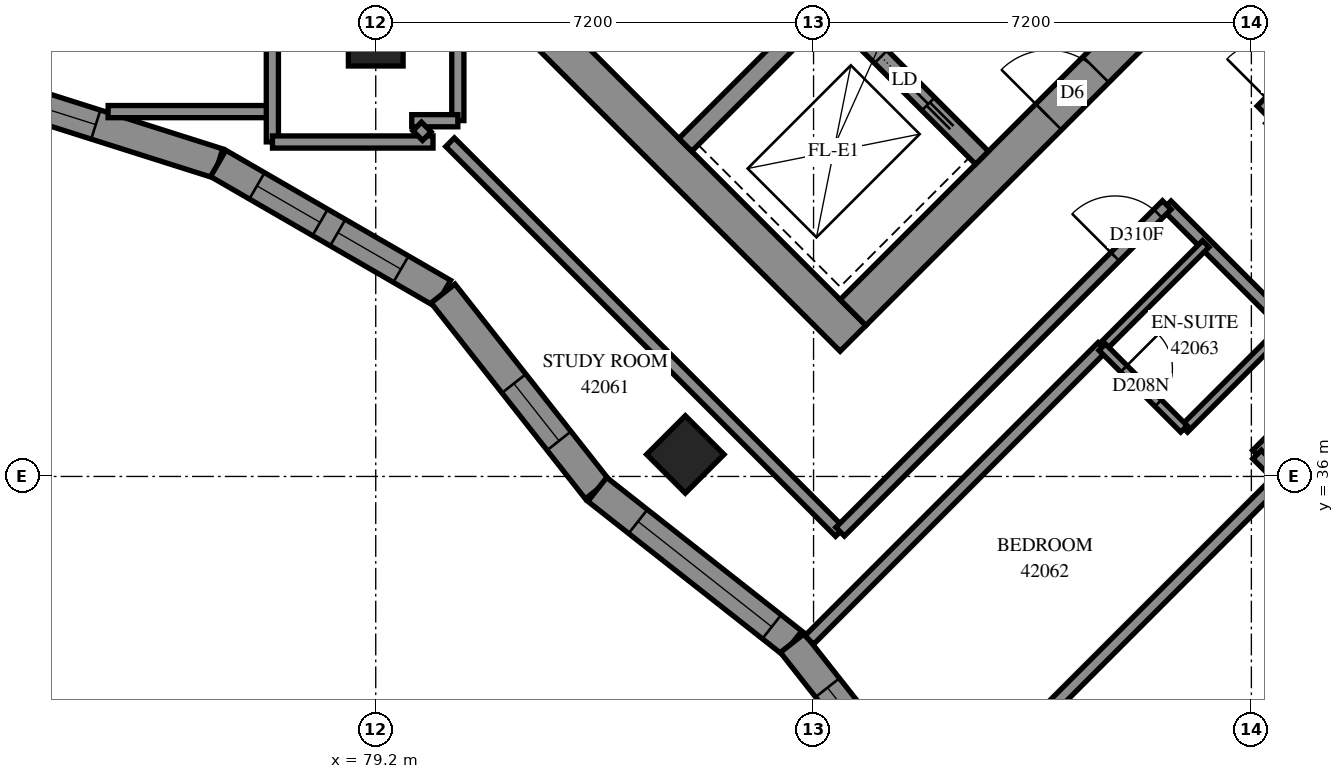
"""IFC4 building model, lengths in metres.
Left out: names, types, materials, properties, quantities, classifications, styles, units other than length and angle.
Written with IfcOpenShell. Run it as: python <this file> out.ifc"""

import sys

from ifc_helpers import new_model, si_unit, direction, frame, frame_2d, origin, origin_2d, place, context, subcontext, project, spatial, polyline, rectangle, outline, extrude, element, fill, save


model = new_model("IFC4")
c1 = context("Model", 3, precision=1e-05, world=origin(), true_north=direction((0.0, 1.0)))
c2 = subcontext(c1, "Body", "Model", "MODEL_VIEW")
j1 = project(units=[si_unit("LENGTHUNIT", "METRE"), si_unit("PLANEANGLEUNIT", "RADIAN")], contexts=[c1])
p1 = place(None, origin())
s1 = spatial("IfcSite", under=j1, at=p1, CompositionType="ELEMENT")
p2 = place(p1, origin())
s2 = spatial("IfcBuilding", under=s1, at=p2, CompositionType="ELEMENT")
p3 = place(p2, frame((0.0, 0.0, 155.8)))
s3 = spatial("IfcBuildingStorey", under=s2, at=p3, CompositionType="ELEMENT", Elevation=155.8)
for number, where, z_axis, x_axis in (
    (1, (79.2, 43.2, 0.0), (0.0, 0.0, 1.0), (1.0, 0.0, 0.0)),
    (2, (84.291, 36.362, 0.0), (0.0, 0.0, 1.0), (0.707, -0.707, 0.0)),
):
    element("IfcColumn", number, at=place(p3, frame(where, z_axis=z_axis, x_axis=x_axis)), inside=s3, PredefinedType="COLUMN", context=c2, shape_type="SweptSolid", body=[
        extrude(rectangle(XDim=0.9, YDim=0.9, at=origin_2d()), origin(), (0.0, 0.0, 1.0), 3.1),
    ])
p4 = place(p3, frame((76.018, 49.302, -0.3), z_axis=(0.0, 0.0, 1.0), x_axis=(0.7071067812, -0.7071067812, 0.0)))
e3 = element("IfcWall", 3, at=p4, inside=s3, PredefinedType="SHEAR", context=c2, shape_type="SweptSolid", body=[
    extrude(rectangle(XDim=15.6, YDim=0.6, at=frame_2d((7.8, 0.0))), origin(), (0.0, 0.0, 1.0), 2.7),
])
p5 = place(p3, frame((87.049, 38.695, -0.3), z_axis=(0.0, 0.0, 1.0), x_axis=(0.7071067812, 0.7071067812, 0.0)))
e4 = element("IfcWall", 4, at=p5, inside=s3, PredefinedType="SHEAR", context=c2, shape_type="SweptSolid", body=[
    extrude(rectangle(XDim=14.4, YDim=0.6, at=frame_2d((7.2, 0.0))), origin(), (0.0, 0.0, 1.0), 2.7),
])
p6 = place(p5, frame((4.55, 0.0, 0.3)))
e5 = element("IfcOpeningElement", 5, at=p6, cuts=e4, PredefinedType="OPENING", context=c2, shape_type="SweptSolid", body=[
    extrude(rectangle(XDim=1.1, YDim=2.1, at=frame_2d((0.55, 1.05))), frame((0.0, 0.31, 0.0), z_axis=(0.0, -1.0, 0.0), x_axis=(1.0, 0.0, 0.0)), (0.0, 0.0, 1.0), 0.62),
])
p7 = place(p5, frame((11.35, 0.0, 0.3)))
e6 = element("IfcOpeningElement", 6, at=p7, cuts=e4, PredefinedType="OPENING", context=c2, shape_type="SweptSolid", body=[
    extrude(rectangle(XDim=1.1, YDim=2.1, at=frame_2d((0.55, 1.05))), frame((0.0, 0.31, 0.0), z_axis=(0.0, -1.0, 0.0), x_axis=(1.0, 0.0, 0.0)), (0.0, 0.0, 1.0), 0.62),
])
p8 = place(p3, frame((84.291, 41.453, 0.0), z_axis=(0.0, 0.0, 1.0), x_axis=(0.7071067812, 0.7071067812, 0.0)))
e7 = element("IfcWall", 7, at=p8, inside=s3, PredefinedType="SOLIDWALL", context=c2, shape_type="SweptSolid", body=[
    extrude(rectangle(XDim=3.3, YDim=0.3, at=frame_2d((1.65, 0.0))), origin(), (0.0, 0.0, 1.0), 3.1),
])
p9 = place(p3, frame((78.988, 51.423, 0.0), z_axis=(0.0, 0.0, 1.0), x_axis=(0.7071067812, -0.7071067812, 0.0)))
e8 = element("IfcWall", 8, at=p9, inside=s3, PredefinedType="SOLIDWALL", context=c2, shape_type="SweptSolid", body=[
    extrude(rectangle(XDim=14.4, YDim=0.3, at=frame_2d((7.2, 0.0))), origin(), (0.0, 0.0, 1.0), 3.1),
])
p10 = place(p9, frame((1.35, 0.0, 0.0)))
e9 = element("IfcOpeningElement", 9, at=p10, cuts=e8, PredefinedType="OPENING", context=c2, shape_type="SweptSolid", body=[
    extrude(rectangle(XDim=0.9, YDim=2.1, at=frame_2d((0.45, 1.05))), frame((0.0, 0.16, 0.0), z_axis=(0.0, -1.0, 0.0), x_axis=(1.0, 0.0, 0.0)), (0.0, 0.0, 1.0), 0.32),
])
p11 = place(p9, frame((4.95, 0.0, 0.0)))
e10 = element("IfcOpeningElement", 10, at=p11, cuts=e8, PredefinedType="OPENING", context=c2, shape_type="SweptSolid", body=[
    extrude(rectangle(XDim=0.9, YDim=2.1, at=frame_2d((0.45, 1.05))), frame((0.0, 0.16, 0.0), z_axis=(0.0, -1.0, 0.0), x_axis=(1.0, 0.0, 0.0)), (0.0, 0.0, 1.0), 0.32),
])
p12 = place(p9, frame((8.55, 0.0, 0.0)))
e11 = element("IfcOpeningElement", 11, at=p12, cuts=e8, PredefinedType="OPENING", context=c2, shape_type="SweptSolid", body=[
    extrude(rectangle(XDim=0.9, YDim=2.1, at=frame_2d((0.45, 1.05))), frame((0.0, 0.16, 0.0), z_axis=(0.0, -1.0, 0.0), x_axis=(1.0, 0.0, 0.0)), (0.0, 0.0, 1.0), 0.32),
])
p13 = place(p9, frame((12.05, 0.0, 0.0)))
e12 = element("IfcOpeningElement", 12, at=p13, cuts=e8, PredefinedType="OPENING", context=c2, shape_type="SweptSolid", body=[
    extrude(rectangle(XDim=1.1, YDim=2.1, at=frame_2d((0.55, 1.05))), frame((0.0, 0.16, 0.0), z_axis=(0.0, -1.0, 0.0), x_axis=(1.0, 0.0, 0.0)), (0.0, 0.0, 1.0), 0.32),
])
p14 = place(p3, frame((73.116, 42.255, 0.0), z_axis=(0.0, 0.0, 1.0), x_axis=(0.9532588183, -0.3021549691, 0.0)))
e13 = element("IfcWall", 13, at=p14, inside=s3, PredefinedType="SOLIDWALL", context=c2, shape_type="SweptSolid", body=[
    extrude(outline(polyline([(0.057, -0.25), (3.638, -0.25), (3.692, 0.25), (-0.057, 0.25), (0.057, -0.25)])), origin(), (0.0, 0.0, 1.0), 3.1),
])
p15 = place(p14, frame((0.353, 0.0, 0.45)))
e14 = element("IfcOpeningElement", 14, at=p15, cuts=e13, PredefinedType="OPENING", context=c2, shape_type="SweptSolid", body=[
    extrude(rectangle(XDim=1.2, YDim=2.5, at=frame_2d((0.6, 1.25))), frame((0.0, 0.26, 0.0), z_axis=(0.0, -1.0, 0.0), x_axis=(1.0, 0.0, 0.0)), (0.0, 0.0, 1.0), 0.52),
])
p16 = place(p3, frame((76.609, 41.148, 0.0), z_axis=(0.0, 0.0, 1.0), x_axis=(0.8655245779, -0.5008664544, 0.0)))
e15 = element("IfcWall", 15, at=p16, inside=s3, PredefinedType="SOLIDWALL", context=c2, shape_type="SweptSolid", body=[
    extrude(outline(polyline([(0.027, -0.25), (4.223, -0.25), (4.319, 0.25), (-0.027, 0.25), (0.027, -0.25)])), origin(), (0.0, 0.0, 1.0), 3.1),
])
p17 = place(p16, frame((0.736, 0.0, 0.45)))
e16 = element("IfcOpeningElement", 16, at=p17, cuts=e15, PredefinedType="OPENING", context=c2, shape_type="SweptSolid", body=[
    extrude(rectangle(XDim=1.2, YDim=2.5, at=frame_2d((0.6, 1.25))), frame((0.0, 0.26, 0.0), z_axis=(0.0, -1.0, 0.0), x_axis=(1.0, 0.0, 0.0)), (0.0, 0.0, 1.0), 0.52),
])
p18 = place(p16, frame((2.272, 0.0, 0.45)))
e17 = element("IfcOpeningElement", 17, at=p18, cuts=e15, PredefinedType="OPENING", context=c2, shape_type="SweptSolid", body=[
    extrude(rectangle(XDim=1.2, YDim=2.5, at=frame_2d((0.6, 1.25))), frame((0.0, 0.26, 0.0), z_axis=(0.0, -1.0, 0.0), x_axis=(1.0, 0.0, 0.0)), (0.0, 0.0, 1.0), 0.52),
])
p19 = place(p3, frame((80.306, 39.009, 0.0), z_axis=(0.0, 0.0, 1.0), x_axis=(0.6186848353, -0.7856392777, 0.0)))
e18 = element("IfcWall", 18, at=p19, inside=s3, PredefinedType="SOLIDWALL", context=c2, shape_type="SweptSolid", body=[
    extrude(outline(polyline([(0.048, -0.25), (4.131, -0.25), (4.071, 0.25), (-0.048, 0.25), (0.048, -0.25)])), origin(), (0.0, 0.0, 1.0), 3.1),
])
p20 = place(p19, frame((1.884, 0.0, 0.45)))
e19 = element("IfcOpeningElement", 19, at=p20, cuts=e18, PredefinedType="OPENING", context=c2, shape_type="SweptSolid", body=[
    extrude(rectangle(XDim=1.2, YDim=2.5, at=frame_2d((0.6, 1.25))), frame((0.0, 0.26, 0.0), z_axis=(0.0, -1.0, 0.0), x_axis=(1.0, 0.0, 0.0)), (0.0, 0.0, 1.0), 0.52),
])
p21 = place(p3, frame((82.844, 35.787, 0.0), z_axis=(0.0, 0.0, 1.0), x_axis=(0.7856464341, -0.6186757476, 0.0)))
e20 = element("IfcWall", 20, at=p21, inside=s3, PredefinedType="SOLIDWALL", context=c2, shape_type="SweptSolid", body=[
    extrude(outline(polyline([(-0.03, -0.25), (4.053, -0.25), (4.112, 0.25), (0.03, 0.25), (-0.03, -0.25)])), origin(), (0.0, 0.0, 1.0), 3.1),
])
p22 = place(p21, frame((0.852, 0.0, 0.45)))
e21 = element("IfcOpeningElement", 21, at=p22, cuts=e20, PredefinedType="OPENING", context=c2, shape_type="SweptSolid", body=[
    extrude(rectangle(XDim=2.8, YDim=2.5, at=frame_2d((1.4, 1.25))), frame((0.0, 0.26, 0.0), z_axis=(0.0, -1.0, 0.0), x_axis=(1.0, 0.0, 0.0)), (0.0, 0.0, 1.0), 0.52),
])
p23 = place(p3, frame((86.051, 33.261, 0.0), z_axis=(0.0, 0.0, 1.0), x_axis=(0.6186757476, -0.7856464341, 0.0)))
e22 = element("IfcWall", 22, at=p23, inside=s3, PredefinedType="SOLIDWALL", context=c2, shape_type="SweptSolid", body=[
    extrude(outline(polyline([(0.03, -0.25), (4.112, -0.25), (4.053, 0.25), (-0.03, 0.25), (0.03, -0.25)])), origin(), (0.0, 0.0, 1.0), 3.1),
])
p24 = place(p23, frame((0.934, 0.0, 0.7)))
e23 = element("IfcOpeningElement", 23, at=p24, cuts=e22, PredefinedType="OPENING", context=c2, shape_type="SweptSolid", body=[
    extrude(rectangle(XDim=1.8, YDim=2.2, at=frame_2d((0.9, 1.1))), frame((0.0, 0.26, 0.0), z_axis=(0.0, -1.0, 0.0), x_axis=(1.0, 0.0, 0.0)), (0.0, 0.0, 1.0), 0.52),
])
p25 = place(p3, frame((92.209, 40.459, 0.0), z_axis=(0.0, 0.0, 1.0), x_axis=(0.7071067812, -0.7071067812, 0.0)))
e24 = element("IfcWall", 24, at=p25, inside=s3, PredefinedType="PARTITIONING", context=c2, shape_type="SweptSolid", body=[
    extrude(rectangle(XDim=11.698, YDim=0.2, at=frame_2d((5.849, 0.0))), origin(), (0.0, 0.0, 1.0), 3.1),
])
p26 = place(p25, frame((3.047, 0.0, 0.0)))
e25 = element("IfcOpeningElement", 25, at=p26, cuts=e24, PredefinedType="OPENING", context=c2, shape_type="SweptSolid", body=[
    extrude(rectangle(XDim=0.9, YDim=2.1, at=frame_2d((0.45, 1.05))), frame((0.0, 0.11, 0.0), z_axis=(0.0, -1.0, 0.0), x_axis=(1.0, 0.0, 0.0)), (0.0, 0.0, 1.0), 0.22),
])
p27 = place(p25, frame((8.056, 0.0, 0.0)))
e26 = element("IfcOpeningElement", 26, at=p27, cuts=e24, PredefinedType="OPENING", context=c2, shape_type="SweptSolid", body=[
    extrude(rectangle(XDim=1.0, YDim=2.1, at=frame_2d((0.5, 1.05))), frame((0.0, 0.11, 0.0), z_axis=(0.0, -1.0, 0.0), x_axis=(1.0, 0.0, 0.0)), (0.0, 0.0, 1.0), 0.22),
])
p28 = place(p3, frame((93.767, 42.021, 0.0), z_axis=(0.0, 0.0, 1.0), x_axis=(0.7071067812, 0.7071067812, 0.0)))
e27 = element("IfcWall", 27, at=p28, inside=s3, PredefinedType="PARTITIONING", context=c2, shape_type="SweptSolid", body=[
    extrude(rectangle(XDim=9.998, YDim=0.2, at=frame_2d((4.999, 0.0))), origin(), (0.0, 0.0, 1.0), 3.1),
])
p29 = place(p28, frame((0.196, 0.0, 0.0)))
e28 = element("IfcOpeningElement", 28, at=p29, cuts=e27, PredefinedType="OPENING", context=c2, shape_type="SweptSolid", body=[
    extrude(rectangle(XDim=1.0, YDim=2.1, at=frame_2d((0.5, 1.05))), frame((0.0, 0.11, 0.0), z_axis=(0.0, -1.0, 0.0), x_axis=(1.0, 0.0, 0.0)), (0.0, 0.0, 1.0), 0.22),
])
p30 = place(p3, frame((80.423, 41.497, 0.0), z_axis=(0.0, 0.0, 1.0), x_axis=(0.7071067812, -0.7071067812, 0.0)))
e29 = element("IfcWall", 29, at=p30, inside=s3, PredefinedType="PARTITIONING", context=c2, shape_type="SweptSolid", body=[
    extrude(rectangle(XDim=9.065, YDim=0.2, at=frame_2d((4.532, 0.0))), origin(), (0.0, 0.0, 1.0), 3.1),
])
p31 = place(p3, frame((86.837, 35.091, 0.0), z_axis=(0.0, 0.0, 1.0), x_axis=(0.7071067812, 0.7071067812, 0.0)))
e30 = element("IfcWall", 30, at=p31, inside=s3, PredefinedType="PARTITIONING", context=c2, shape_type="SweptSolid", body=[
    extrude(rectangle(XDim=7.597, YDim=0.2, at=frame_2d((3.799, 0.0))), origin(), (0.0, 0.0, 1.0), 3.1),
])
p32 = place(p31, frame((6.395, 0.0, 0.0)))
e31 = element("IfcOpeningElement", 31, at=p32, cuts=e30, PredefinedType="OPENING", context=c2, shape_type="SweptSolid", body=[
    extrude(rectangle(XDim=1.0, YDim=2.1, at=frame_2d((0.5, 1.05))), frame((0.0, 0.11, 0.0), z_axis=(0.0, -1.0, 0.0), x_axis=(1.0, 0.0, 0.0)), (0.0, 0.0, 1.0), 0.22),
])
p33 = place(p3, frame((86.33, 33.311, 0.0), z_axis=(0.0, 0.0, 1.0), x_axis=(0.7071067812, 0.7071067812, 0.0)))
e32 = element("IfcWall", 32, at=p33, inside=s3, PredefinedType="PARTITIONING", context=c2, shape_type="SweptSolid", body=[
    extrude(rectangle(XDim=6.816, YDim=0.2, at=frame_2d((3.408, 0.0))), origin(), (0.0, 0.0, 1.0), 3.1),
])
p34 = place(p3, frame((89.831, 31.721, 0.0), z_axis=(0.0, 0.0, 1.0), x_axis=(0.7071067812, 0.7071067812, 0.0)))
e33 = element("IfcWall", 33, at=p34, inside=s3, PredefinedType="PARTITIONING", context=c2, shape_type="SweptSolid", body=[
    extrude(rectangle(XDim=5.928, YDim=0.2, at=frame_2d((2.964, 0.0))), origin(), (0.0, 0.0, 1.0), 3.1),
])
p35 = place(p3, frame((74.799, 42.0, 0.0), z_axis=(0.0, 0.0, 1.0), x_axis=(1.0, 0.0, 0.0)))
e34 = element("IfcWall", 34, at=p35, inside=s3, PredefinedType="PARTITIONING", context=c2, shape_type="SweptSolid", body=[
    extrude(rectangle(XDim=2.701, YDim=0.2, at=frame_2d((1.351, 0.0))), origin(), (0.0, 0.0, 1.0), 3.1),
])
for number, where, z_axis, x_axis in (
    (35, (77.5, 41.502, 0.0), (0.0, 0.0, 1.0), (0.0, 1.0, 0.0)),
    (36, (77.502, 41.5, 0.0), (0.0, 0.0, 1.0), (1.0, 0.0, 0.0)),
):
    element("IfcWall", number, at=place(p3, frame(where, z_axis=z_axis, x_axis=x_axis)), inside=s3, PredefinedType="PARTITIONING", context=c2, shape_type="SweptSolid", body=[
        extrude(rectangle(XDim=2.64, YDim=0.2, at=frame_2d((1.32, 0.0))), origin(), (0.0, 0.0, 1.0), 3.1),
    ])
for number, where, z_axis, x_axis in (
    (37, (91.152, 38.128, 0.0), (0.0, 0.0, 1.0), (0.708, 0.707, 0.0)),
    (38, (92.497, 36.783, 0.0), (0.0, 0.0, 1.0), (0.707, 0.708, 0.0)),
):
    element("IfcWall", number, at=place(p3, frame(where, z_axis=z_axis, x_axis=x_axis)), inside=s3, PredefinedType="PARTITIONING", context=c2, shape_type="SweptSolid", body=[
        extrude(rectangle(XDim=2.4, YDim=0.15, at=frame_2d((1.2, 0.0))), origin(), (0.0, 0.0, 1.0), 3.1),
    ])
p36 = place(p3, frame((80.55, 41.852, 0.0), z_axis=(0.0, 0.0, 1.0), x_axis=(0.0, 1.0, 0.0)))
e39 = element("IfcWall", 39, at=p36, inside=s3, PredefinedType="PARTITIONING", context=c2, shape_type="SweptSolid", body=[
    extrude(rectangle(XDim=2.38, YDim=0.2, at=frame_2d((1.19, 0.0))), origin(), (0.0, 0.0, 1.0), 3.1),
])
p37 = place(p3, frame((91.147, 38.127, 0.0), z_axis=(0.0, 0.0, 1.0), x_axis=(0.7071067812, -0.7071067812, 0.0)))
e40 = element("IfcWall", 40, at=p37, inside=s3, PredefinedType="PARTITIONING", context=c2, shape_type="SweptSolid", body=[
    extrude(rectangle(XDim=1.901, YDim=0.15, at=frame_2d((0.95, 0.0))), origin(), (0.0, 0.0, 1.0), 3.1),
])
p38 = place(p37, frame((0.502, 0.0, 0.0)))
e41 = element("IfcOpeningElement", 41, at=p38, cuts=e40, PredefinedType="OPENING", context=c2, shape_type="SweptSolid", body=[
    extrude(rectangle(XDim=0.8, YDim=2.1, at=frame_2d((0.4, 1.05))), frame((0.0, 0.085, 0.0), z_axis=(0.0, -1.0, 0.0), x_axis=(1.0, 0.0, 0.0)), (0.0, 0.0, 1.0), 0.17),
])
p39 = place(p3, frame((79.792, 41.85, 0.0), z_axis=(0.0, 0.0, 1.0), x_axis=(1.0, 0.0, 0.0)))
e42 = element("IfcWall", 42, at=p39, inside=s3, PredefinedType="PARTITIONING", context=c2, shape_type="SweptSolid", body=[
    extrude(rectangle(XDim=0.758, YDim=0.2, at=frame_2d((0.379, 0.0))), origin(), (0.0, 0.0, 1.0), 3.1),
])
p40 = place(p3, frame((79.881, 41.755, 0.0), z_axis=(0.0, 0.0, 1.0), x_axis=(0.7071067812, -0.7071067812, 0.0)))
e43 = element("IfcWall", 43, at=p40, inside=s3, PredefinedType="PARTITIONING", context=c2, shape_type="SweptSolid", body=[
    extrude(rectangle(XDim=0.225, YDim=0.2, at=frame_2d((0.113, 0.0))), origin(), (0.0, 0.0, 1.0), 3.1),
])
p41 = place(p3, frame((93.691, 36.359, 0.0), z_axis=(0.0, 0.0, 1.0), x_axis=(0.7071067812, 0.7071067812, 0.0)))
e44 = element("IfcWall", 44, at=p41, inside=s3, PredefinedType="PARTITIONING", context=c2, shape_type="SweptSolid", body=[
    extrude(rectangle(XDim=0.469, YDim=0.2, at=frame_2d((0.235, 0.0))), origin(), (0.0, 0.0, 1.0), 3.1),
])
p42 = place(p3, frame((93.695, 36.361, 0.0), z_axis=(0.0, 0.0, 1.0), x_axis=(0.7092398187, -0.7049672897, 0.0)))
e45 = element("IfcWall", 45, at=p42, inside=s3, PredefinedType="PARTITIONING", context=c2, shape_type="SweptSolid", body=[
    extrude(rectangle(XDim=0.468, YDim=0.2, at=frame_2d((0.234, 0.0))), origin(), (0.0, 0.0, 1.0), 3.1),
])
p43 = place(p15, origin())
e46 = element("IfcWindow", 46, at=p43, inside=s3, PartitioningType="SINGLE_PANEL", PredefinedType="WINDOW", context=c2, shape_type="SweptSolid", body=[
    extrude(rectangle(XDim=1.2, YDim=2.5, at=frame_2d((0.6, 1.25))), frame((0.0, 0.18, 0.0), z_axis=(0.0, -1.0, 0.0), x_axis=(1.0, 0.0, 0.0)), (0.0, 0.0, 1.0), 0.06),
])
fill(e14, e46)
p44 = place(p17, origin())
e47 = element("IfcWindow", 47, at=p44, inside=s3, PartitioningType="SINGLE_PANEL", PredefinedType="WINDOW", context=c2, shape_type="SweptSolid", body=[
    extrude(rectangle(XDim=1.2, YDim=2.5, at=frame_2d((0.6, 1.25))), frame((0.0, 0.18, 0.0), z_axis=(0.0, -1.0, 0.0), x_axis=(1.0, 0.0, 0.0)), (0.0, 0.0, 1.0), 0.06),
])
fill(e16, e47)
p45 = place(p18, origin())
e48 = element("IfcWindow", 48, at=p45, inside=s3, PartitioningType="SINGLE_PANEL", PredefinedType="WINDOW", context=c2, shape_type="SweptSolid", body=[
    extrude(rectangle(XDim=1.2, YDim=2.5, at=frame_2d((0.6, 1.25))), frame((0.0, 0.18, 0.0), z_axis=(0.0, -1.0, 0.0), x_axis=(1.0, 0.0, 0.0)), (0.0, 0.0, 1.0), 0.06),
])
fill(e17, e48)
p46 = place(p20, origin())
e49 = element("IfcWindow", 49, at=p46, inside=s3, PartitioningType="SINGLE_PANEL", PredefinedType="WINDOW", context=c2, shape_type="SweptSolid", body=[
    extrude(rectangle(XDim=1.2, YDim=2.5, at=frame_2d((0.6, 1.25))), frame((0.0, 0.18, 0.0), z_axis=(0.0, -1.0, 0.0), x_axis=(1.0, 0.0, 0.0)), (0.0, 0.0, 1.0), 0.06),
])
fill(e19, e49)
p47 = place(p22, origin())
e50 = element("IfcWindow", 50, at=p47, inside=s3, PartitioningType="SINGLE_PANEL", PredefinedType="WINDOW", context=c2, shape_type="SweptSolid", body=[
    extrude(rectangle(XDim=2.8, YDim=2.5, at=frame_2d((1.4, 1.25))), frame((0.0, 0.18, 0.0), z_axis=(0.0, -1.0, 0.0), x_axis=(1.0, 0.0, 0.0)), (0.0, 0.0, 1.0), 0.06),
])
fill(e21, e50)
p48 = place(p6, origin())
e51 = element("IfcDoor", 51, at=p48, inside=s3, OperationType="DOUBLE_DOOR_SINGLE_SWING", PredefinedType="DOOR", context=c2, shape_type="SweptSolid", body=[
    extrude(rectangle(XDim=1.1, YDim=2.1, at=frame_2d((0.55, 1.05))), frame((0.0, 0.025, 0.0), z_axis=(0.0, -1.0, 0.0), x_axis=(1.0, 0.0, 0.0)), (0.0, 0.0, 1.0), 0.05),
])
fill(e5, e51)
p49 = place(p13, origin())
e52 = element("IfcDoor", 52, at=p49, inside=s3, OperationType="SLIDING_TO_RIGHT", PredefinedType="DOOR", context=c2, shape_type="SweptSolid", body=[
    extrude(rectangle(XDim=1.1, YDim=2.1, at=frame_2d((0.55, 1.05))), frame((0.0, 0.025, 0.0), z_axis=(0.0, -1.0, 0.0), x_axis=(1.0, 0.0, 0.0)), (0.0, 0.0, 1.0), 0.05),
])
fill(e12, e52)
p50 = place(p32, origin())
e53 = element("IfcDoor", 53, at=p50, inside=s3, OperationType="SINGLE_SWING_LEFT", PredefinedType="DOOR", context=c2, shape_type="SweptSolid", body=[
    extrude(rectangle(XDim=1.0, YDim=2.1, at=frame_2d((0.5, 1.05))), frame((0.0, 0.025, 0.0), z_axis=(0.0, -1.0, 0.0), x_axis=(1.0, 0.0, 0.0)), (0.0, 0.0, 1.0), 0.05),
])
fill(e31, e53)
p51 = place(p38, origin())
e54 = element("IfcDoor", 54, at=p51, inside=s3, OperationType="SINGLE_SWING_RIGHT", PredefinedType="DOOR", context=c2, shape_type="SweptSolid", body=[
    extrude(rectangle(XDim=0.8, YDim=2.1, at=frame_2d((0.4, 1.05))), frame((0.0, 0.025, 0.0), z_axis=(0.0, -1.0, 0.0), x_axis=(1.0, 0.0, 0.0)), (0.0, 0.0, 1.0), 0.05),
])
fill(e41, e54)
p52 = place(p24, origin())
e55 = element("IfcWindow", 55, at=p52, inside=s3, PartitioningType="SINGLE_PANEL", PredefinedType="WINDOW", context=c2, shape_type="SweptSolid", body=[
    extrude(rectangle(XDim=1.8, YDim=2.2, at=frame_2d((0.9, 1.1))), frame((0.0, 0.18, 0.0), z_axis=(0.0, -1.0, 0.0), x_axis=(1.0, 0.0, 0.0)), (0.0, 0.0, 1.0), 0.06),
])
fill(e23, e55)
save(model, sys.argv[1])
